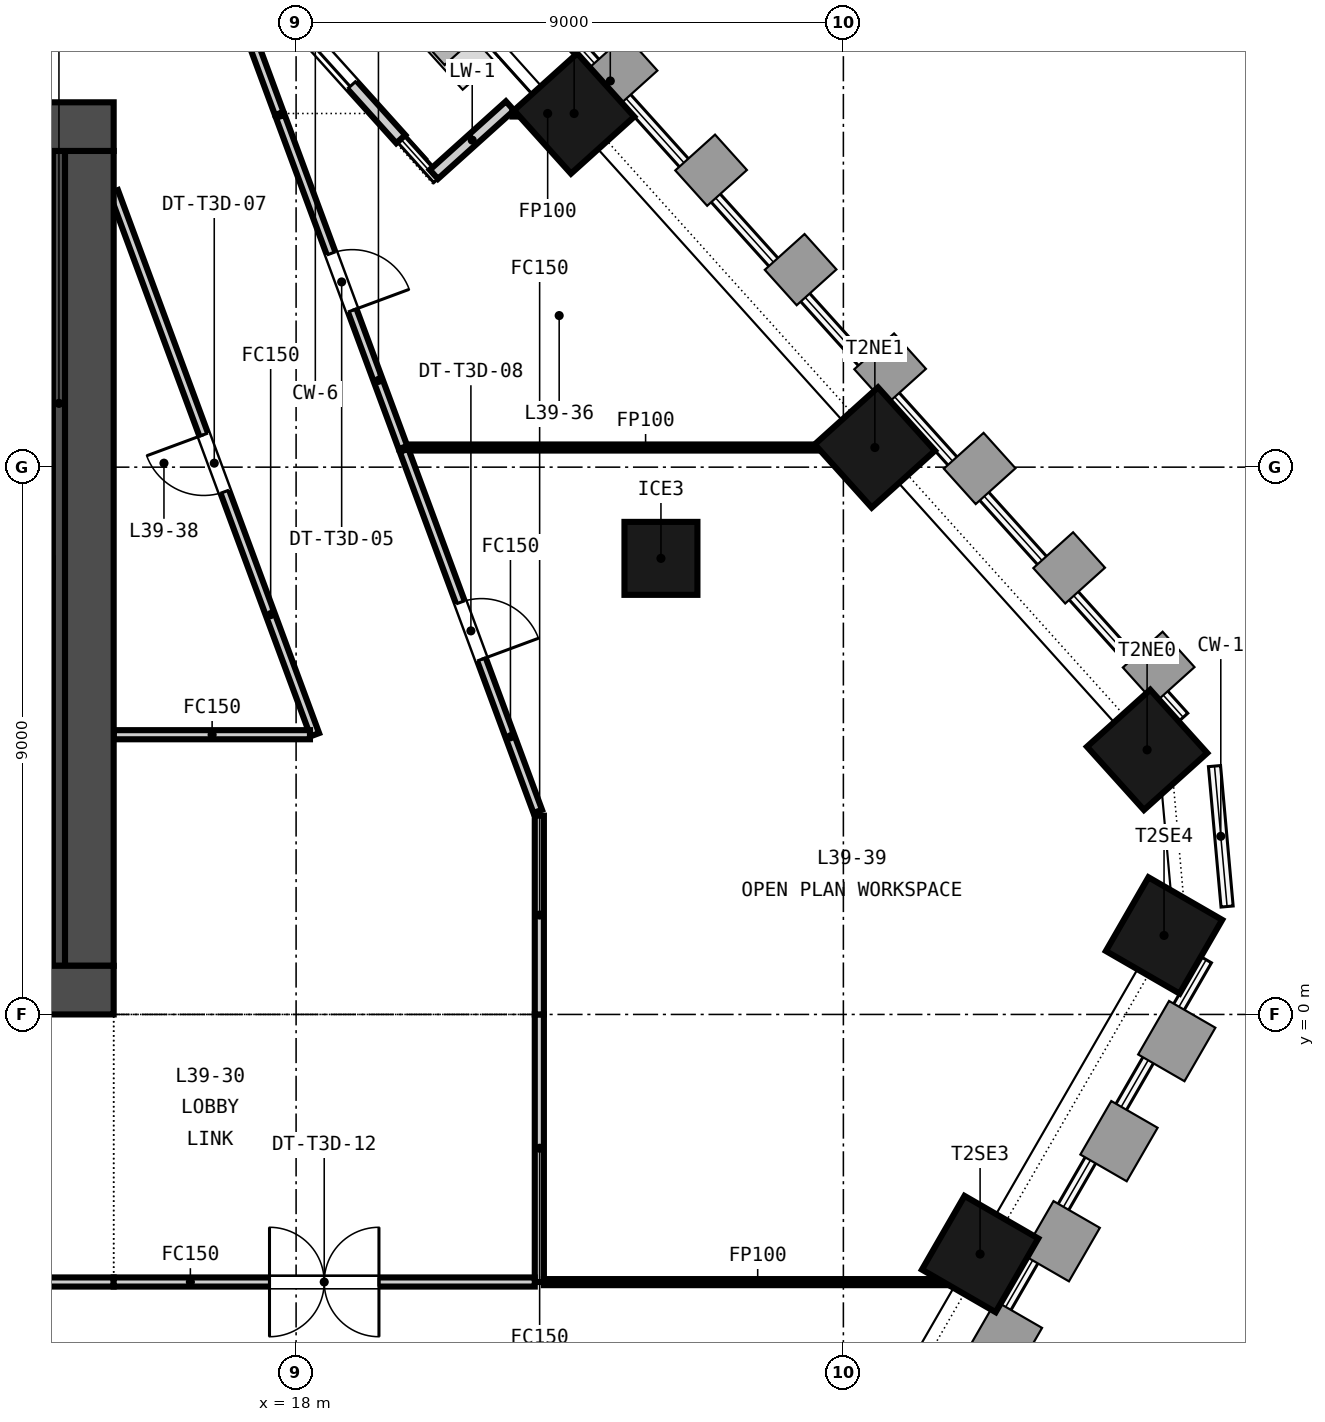
"""IFC4 building model, lengths in metres.
Left out: names, types, materials, properties, quantities, classifications, styles, units other than length and angle.
Written with IfcOpenShell. Run it as: python <this file> out.ifc"""

import sys

from ifc_helpers import new_model, si_unit, direction, frame, frame_2d, origin, origin_2d, place, context, subcontext, project, spatial, rectangle, extrude, element, fill, save


model = new_model("IFC4")
c1 = context("Model", 3, precision=1e-05, world=origin(), true_north=direction((0.0, 1.0)))
c2 = subcontext(c1, "Body", "Model", "MODEL_VIEW")
j1 = project(units=[si_unit("LENGTHUNIT", "METRE"), si_unit("PLANEANGLEUNIT", "RADIAN")], contexts=[c1])
p1 = place(None, origin())
s1 = spatial("IfcSite", under=j1, at=p1, CompositionType="ELEMENT")
p2 = place(p1, origin())
s2 = spatial("IfcBuilding", under=s1, at=p2, CompositionType="ELEMENT")
p3 = place(p2, frame((0.0, 0.0, 159.0)))
s3 = spatial("IfcBuildingStorey", under=s2, at=p3, CompositionType="ELEMENT", Elevation=159.0)
p4 = place(p3, frame((-15.0, 0.4, -0.15), z_axis=(0.0, 0.0, 1.0), x_axis=(1.0, 0.0, 0.0)))
e1 = element("IfcWall", 1, at=p4, inside=s3, PredefinedType="SOLIDWALL", context=c2, shape_type="SweptSolid", body=[
    extrude(rectangle(XDim=30.0, YDim=0.8, at=frame_2d((15.0, 0.0))), origin(), (0.0, 0.0, 1.0), 3.65),
])
p5 = place(p4, frame((5.8, 0.0, 0.15)))
e2 = element("IfcOpeningElement", 2, at=p5, cuts=e1, PredefinedType="OPENING", context=c2, shape_type="SweptSolid", body=[
    extrude(rectangle(XDim=2.4, YDim=2.4, at=frame_2d((1.2, 1.2))), frame((0.0, 0.41, 0.0), z_axis=(0.0, -1.0, 0.0), x_axis=(1.0, 0.0, 0.0)), (0.0, 0.0, 1.0), 0.82),
])
p6 = place(p4, frame((13.8, 0.0, 0.15)))
e3 = element("IfcOpeningElement", 3, at=p6, cuts=e1, PredefinedType="OPENING", context=c2, shape_type="SweptSolid", body=[
    extrude(rectangle(XDim=2.4, YDim=2.4, at=frame_2d((1.2, 1.2))), frame((0.0, 0.41, 0.0), z_axis=(0.0, -1.0, 0.0), x_axis=(1.0, 0.0, 0.0)), (0.0, 0.0, 1.0), 0.82),
])
p7 = place(p4, frame((21.8, 0.0, 0.15)))
e4 = element("IfcOpeningElement", 4, at=p7, cuts=e1, PredefinedType="OPENING", context=c2, shape_type="SweptSolid", body=[
    extrude(rectangle(XDim=2.4, YDim=2.4, at=frame_2d((1.2, 1.2))), frame((0.0, 0.41, 0.0), z_axis=(0.0, -1.0, 0.0), x_axis=(1.0, 0.0, 0.0)), (0.0, 0.0, 1.0), 0.82),
])
p8 = place(p4, frame((1.5, 0.0, 0.15)))
e5 = element("IfcOpeningElement", 5, at=p8, cuts=e1, PredefinedType="OPENING", context=c2, shape_type="SweptSolid", body=[
    extrude(rectangle(XDim=1.2, YDim=2.1, at=frame_2d((0.6, 1.05))), frame((0.0, 0.41, 0.0), z_axis=(0.0, -1.0, 0.0), x_axis=(1.0, 0.0, 0.0)), (0.0, 0.0, 1.0), 0.82),
])
p9 = place(p4, frame((27.3, 0.0, 0.15)))
e6 = element("IfcOpeningElement", 6, at=p9, cuts=e1, PredefinedType="OPENING", context=c2, shape_type="SweptSolid", body=[
    extrude(rectangle(XDim=1.2, YDim=2.1, at=frame_2d((0.6, 1.05))), frame((0.0, 0.41, 0.0), z_axis=(0.0, -1.0, 0.0), x_axis=(1.0, 0.0, 0.0)), (0.0, 0.0, 1.0), 0.82),
])
p10 = place(p3, frame((-15.0, 14.6, -0.15), z_axis=(0.0, 0.0, 1.0), x_axis=(1.0, 0.0, 0.0)))
e7 = element("IfcWall", 7, at=p10, inside=s3, PredefinedType="SOLIDWALL", context=c2, shape_type="SweptSolid", body=[
    extrude(rectangle(XDim=30.0, YDim=0.8, at=frame_2d((15.0, 0.0))), origin(), (0.0, 0.0, 1.0), 3.65),
])
p11 = place(p10, frame((9.25, 0.0, 0.15)))
e8 = element("IfcOpeningElement", 8, at=p11, cuts=e7, PredefinedType="OPENING", context=c2, shape_type="SweptSolid", body=[
    extrude(rectangle(XDim=1.5, YDim=2.1, at=frame_2d((0.75, 1.05))), frame((0.0, 0.41, 0.0), z_axis=(0.0, -1.0, 0.0), x_axis=(1.0, 0.0, 0.0)), (0.0, 0.0, 1.0), 0.82),
])
p12 = place(p10, frame((19.4, 0.0, 0.15)))
e9 = element("IfcOpeningElement", 9, at=p12, cuts=e7, PredefinedType="OPENING", context=c2, shape_type="SweptSolid", body=[
    extrude(rectangle(XDim=1.5, YDim=2.1, at=frame_2d((0.75, 1.05))), frame((0.0, 0.41, 0.0), z_axis=(0.0, -1.0, 0.0), x_axis=(1.0, 0.0, 0.0)), (0.0, 0.0, 1.0), 0.82),
])
p13 = place(p10, frame((1.5, 0.0, 0.15)))
e10 = element("IfcOpeningElement", 10, at=p13, cuts=e7, PredefinedType="OPENING", context=c2, shape_type="SweptSolid", body=[
    extrude(rectangle(XDim=1.2, YDim=2.1, at=frame_2d((0.6, 1.05))), frame((0.0, 0.41, 0.0), z_axis=(0.0, -1.0, 0.0), x_axis=(1.0, 0.0, 0.0)), (0.0, 0.0, 1.0), 0.82),
])
p14 = place(p10, frame((27.3, 0.0, 0.15)))
e11 = element("IfcOpeningElement", 11, at=p14, cuts=e7, PredefinedType="OPENING", context=c2, shape_type="SweptSolid", body=[
    extrude(rectangle(XDim=1.2, YDim=2.1, at=frame_2d((0.6, 1.05))), frame((0.0, 0.41, 0.0), z_axis=(0.0, -1.0, 0.0), x_axis=(1.0, 0.0, 0.0)), (0.0, 0.0, 1.0), 0.82),
])
p15 = place(p3, frame((14.6, 0.8, -0.15), z_axis=(0.0, 0.0, 1.0), x_axis=(0.0, 1.0, 0.0)))
e12 = element("IfcWall", 12, at=p15, inside=s3, PredefinedType="SOLIDWALL", context=c2, shape_type="SweptSolid", body=[
    extrude(rectangle(XDim=13.4, YDim=0.8, at=frame_2d((6.7, 0.0))), origin(), (0.0, 0.0, 1.0), 3.65),
])
for number, where, z_axis, x_axis in (
    (13, (29.248, -3.94, -0.15), (0.0, 0.0, 1.0), (0.5, 0.866, 0.0)),
    (14, (32.273, 1.299, -0.15), (0.0, 0.0, 1.0), (0.5, 0.866, 0.0)),
    (15, (31.995, 4.351, -0.15), (0.0, 0.0, 1.0), (-0.669, 0.743, 0.0)),
    (16, (27.518, 9.323, -0.15), (0.0, 0.0, 1.0), (-0.669, 0.743, 0.0)),
    (17, (22.573, 14.816, -0.15), (0.0, 0.0, 1.0), (-0.669, 0.743, 0.0)),
):
    element("IfcColumn", number, at=place(p3, frame(where, z_axis=z_axis, x_axis=x_axis)), inside=s3, PredefinedType="COLUMN", context=c2, shape_type="SweptSolid", body=[
        extrude(rectangle(XDim=1.4, YDim=1.4, at=origin_2d()), origin(), (0.0, 0.0, 1.0), 3.65),
    ])
p16 = place(p3, frame((24.0, 7.5, -0.15), z_axis=(0.0, 0.0, 1.0), x_axis=(1.0, 0.0, 0.0)))
e18 = element("IfcColumn", 18, at=p16, inside=s3, PredefinedType="COLUMN", context=c2, shape_type="SweptSolid", body=[
    extrude(rectangle(XDim=1.2, YDim=1.2, at=origin_2d()), origin(), (0.0, 0.0, 1.0), 3.65),
])
p17 = place(p3, frame((19.721, 14.395, 0.0), z_axis=(0.0, 0.0, 1.0), x_axis=(-0.669170241733, 0.743109135712, 0.0)))
e19 = element("IfcWall", 19, at=p17, inside=s3, PredefinedType="SOLIDWALL", context=c2, shape_type="SweptSolid", body=[
    extrude(rectangle(XDim=4.2, YDim=0.2, at=frame_2d((2.1, 0.0))), origin(), (0.0, 0.0, 1.0), 2.897),
])
p18 = place(p17, frame((1.2, 0.0, 0.0)))
e20 = element("IfcOpeningElement", 20, at=p18, cuts=e19, PredefinedType="OPENING", context=c2, shape_type="SweptSolid", body=[
    extrude(rectangle(XDim=1.8, YDim=2.4, at=frame_2d((0.9, 1.2))), frame((0.0, 0.11, 0.0), z_axis=(0.0, -1.0, 0.0), x_axis=(1.0, 0.0, 0.0)), (0.0, 0.0, 1.0), 0.22),
])
p19 = place(p3, frame((21.517, 14.942, 0.0), z_axis=(0.0, 0.0, 1.0), x_axis=(-0.743178790238, -0.669092882745, 0.0)))
e21 = element("IfcWall", 21, at=p19, inside=s3, PredefinedType="SOLIDWALL", context=c2, shape_type="SweptSolid", body=[
    extrude(rectangle(XDim=1.684, YDim=0.2, at=frame_2d((0.842, 0.0))), origin(), (0.0, 0.0, 1.0), 2.897),
])
p20 = place(p3, frame((11.05, 7.35, 0.0), z_axis=(0.0, 0.0, 1.0), x_axis=(1.0, 0.0, 0.0)))
e22 = element("IfcWall", 22, at=p20, inside=s3, PredefinedType="SOLIDWALL", context=c2, shape_type="SweptSolid", body=[
    extrude(rectangle(XDim=2.95, YDim=0.3, at=frame_2d((1.475, 0.0))), origin(), (0.0, 0.0, 1.0), 3.5),
])
p21 = place(p3, frame((14.1, 0.8, 0.0), z_axis=(0.0, 0.0, 1.0), x_axis=(0.0, 1.0, 0.0)))
e23 = element("IfcWall", 23, at=p21, inside=s3, PredefinedType="SOLIDWALL", context=c2, shape_type="SweptSolid", body=[
    extrude(rectangle(XDim=13.4, YDim=0.2, at=frame_2d((6.7, 0.0))), origin(), (0.0, 0.0, 1.0), 3.5),
])
p22 = place(p3, frame((15.0, -4.4, 0.0), z_axis=(0.0, 0.0, 1.0), x_axis=(-1.0, 0.0, 0.0)))
e24 = element("IfcWall", 24, at=p22, inside=s3, PredefinedType="PARTITIONING", context=c2, shape_type="SweptSolid", body=[
    extrude(rectangle(XDim=10.505, YDim=0.15, at=frame_2d((5.252, 0.0))), origin(), (0.0, 0.0, 1.0), 2.741),
])
p23 = place(p22, frame((4.353, 0.0, 0.0)))
e25 = element("IfcOpeningElement", 25, at=p23, cuts=e24, PredefinedType="OPENING", context=c2, shape_type="SweptSolid", body=[
    extrude(rectangle(XDim=1.8, YDim=2.1, at=frame_2d((0.9, 1.05))), frame((0.0, 0.085, 0.0), z_axis=(0.0, -1.0, 0.0), x_axis=(1.0, 0.0, 0.0)), (0.0, 0.0, 1.0), 0.17),
])
p24 = place(p3, frame((22.0, 0.0, 0.0), z_axis=(0.0, 0.0, 1.0), x_axis=(0.0, -1.0, 0.0)))
e26 = element("IfcWall", 26, at=p24, inside=s3, PredefinedType="PARTITIONING", context=c2, shape_type="SweptSolid", body=[
    extrude(rectangle(XDim=4.4, YDim=0.15, at=frame_2d((2.2, 0.0))), origin(), (0.0, 0.0, 1.0), 2.741),
])
p25 = place(p3, frame((21.925, -4.4, 0.0), z_axis=(0.0, 0.0, 1.0), x_axis=(-1.0, 0.0, 0.0)))
e27 = element("IfcWall", 27, at=p25, inside=s3, PredefinedType="PARTITIONING", context=c2, shape_type="SweptSolid", body=[
    extrude(rectangle(XDim=6.925, YDim=0.15, at=frame_2d((3.462, 0.0))), origin(), (0.0, 0.0, 1.0), 2.741),
])
p26 = place(p25, frame((2.562, 0.0, 0.0)))
e28 = element("IfcOpeningElement", 28, at=p26, cuts=e27, PredefinedType="OPENING", context=c2, shape_type="SweptSolid", body=[
    extrude(rectangle(XDim=1.8, YDim=2.1, at=frame_2d((0.9, 1.05))), frame((0.0, 0.085, 0.0), z_axis=(0.0, -1.0, 0.0), x_axis=(1.0, 0.0, 0.0)), (0.0, 0.0, 1.0), 0.17),
])
p27 = place(p3, frame((18.308, 4.6, 0.0), z_axis=(0.0, 0.0, 1.0), x_axis=(-0.347347751601, 0.937736391241, 0.0)))
e29 = element("IfcWall", 29, at=p27, inside=s3, PredefinedType="PARTITIONING", context=c2, shape_type="SweptSolid", body=[
    extrude(rectangle(XDim=9.524, YDim=0.15, at=frame_2d((4.762, 0.0))), origin(), (0.0, 0.0, 1.0), 2.741),
])
p28 = place(p27, frame((4.262, 0.0, 0.0)))
e30 = element("IfcOpeningElement", 30, at=p28, cuts=e29, PredefinedType="OPENING", context=c2, shape_type="SweptSolid", body=[
    extrude(rectangle(XDim=1.0, YDim=2.1, at=frame_2d((0.5, 1.05))), frame((0.0, 0.085, 0.0), z_axis=(0.0, -1.0, 0.0), x_axis=(1.0, 0.0, 0.0)), (0.0, 0.0, 1.0), 0.17),
])
p29 = place(p3, frame((22.0, 3.269, 0.0), z_axis=(0.0, 0.0, 1.0), x_axis=(0.0, -1.0, 0.0)))
e31 = element("IfcWall", 31, at=p29, inside=s3, PredefinedType="PARTITIONING", context=c2, shape_type="SweptSolid", body=[
    extrude(rectangle(XDim=3.269, YDim=0.15, at=frame_2d((1.635, 0.0))), origin(), (0.0, 0.0, 1.0), 2.741),
])
p30 = place(p3, frame((16.617, 17.802, 0.0), z_axis=(0.0, 0.0, 1.0), x_axis=(0.347221966082, -0.937782973971, 0.0)))
e32 = element("IfcWall", 32, at=p30, inside=s3, PredefinedType="PARTITIONING", context=c2, shape_type="SweptSolid", body=[
    extrude(rectangle(XDim=3.185, YDim=0.15, at=frame_2d((1.592, 0.0))), origin(), (0.0, 0.0, 1.0), 2.741),
])
p31 = place(p3, frame((21.557, 14.816, 0.0), z_axis=(0.0, 0.0, 1.0), x_axis=(1.0, 0.0, 0.0)))
e33 = element("IfcWall", 33, at=p31, inside=s3, PredefinedType="PARTITIONING", context=c2, shape_type="SweptSolid", body=[
    extrude(rectangle(XDim=1.15, YDim=0.1, at=frame_2d((0.575, 0.0))), origin(), (0.0, 0.0, 1.0), 2.741),
])
p32 = place(p3, frame((17.74, 14.769, 0.0), z_axis=(0.0, 0.0, 1.0), x_axis=(0.347393763434, -0.937719346674, 0.0)))
e34 = element("IfcWall", 34, at=p32, inside=s3, PredefinedType="PARTITIONING", context=c2, shape_type="SweptSolid", body=[
    extrude(rectangle(XDim=5.808, YDim=0.15, at=frame_2d((2.904, 0.0))), origin(), (0.0, 0.0, 1.0), 2.741),
])
p33 = place(p32, frame((2.404, 0.0, 0.0)))
e35 = element("IfcOpeningElement", 35, at=p33, cuts=e34, PredefinedType="OPENING", context=c2, shape_type="SweptSolid", body=[
    extrude(rectangle(XDim=1.0, YDim=2.1, at=frame_2d((0.5, 1.05))), frame((0.0, 0.085, 0.0), z_axis=(0.0, -1.0, 0.0), x_axis=(1.0, 0.0, 0.0)), (0.0, 0.0, 1.0), 0.17),
])
p34 = place(p3, frame((19.833, 9.323, 0.0), z_axis=(0.0, 0.0, 1.0), x_axis=(1.0, 0.0, 0.0)))
e36 = element("IfcWall", 36, at=p34, inside=s3, PredefinedType="PARTITIONING", context=c2, shape_type="SweptSolid", body=[
    extrude(rectangle(XDim=7.819, YDim=0.1, at=frame_2d((3.91, 0.0))), origin(), (0.0, 0.0, 1.0), 2.741),
])
p35 = place(p3, frame((15.0, 4.6, 0.0), z_axis=(0.0, 0.0, 1.0), x_axis=(1.0, 0.0, 0.0)))
e37 = element("IfcWall", 37, at=p35, inside=s3, PredefinedType="PARTITIONING", context=c2, shape_type="SweptSolid", body=[
    extrude(rectangle(XDim=3.228, YDim=0.15, at=frame_2d((1.614, 0.0))), origin(), (0.0, 0.0, 1.0), 2.741),
])
p36 = place(p3, frame((19.775, 9.276, 0.0), z_axis=(0.0, 0.0, 1.0), x_axis=(0.347304307854, -0.937752482133, 0.0)))
e38 = element("IfcWall", 38, at=p36, inside=s3, PredefinedType="PARTITIONING", context=c2, shape_type="SweptSolid", body=[
    extrude(rectangle(XDim=6.331, YDim=0.15, at=frame_2d((3.166, 0.0))), origin(), (0.0, 0.0, 1.0), 2.741),
])
p37 = place(p36, frame((2.665, 0.0, 0.0)))
e39 = element("IfcOpeningElement", 39, at=p37, cuts=e38, PredefinedType="OPENING", context=c2, shape_type="SweptSolid", body=[
    extrude(rectangle(XDim=1.0, YDim=2.1, at=frame_2d((0.5, 1.05))), frame((0.0, 0.085, 0.0), z_axis=(0.0, -1.0, 0.0), x_axis=(1.0, 0.0, 0.0)), (0.0, 0.0, 1.0), 0.17),
])
p38 = place(p3, frame((22.075, -4.402, 0.0), z_axis=(0.0, 0.0, 1.0), x_axis=(1.0, 0.0, 0.0)))
e40 = element("IfcWall", 40, at=p38, inside=s3, PredefinedType="PARTITIONING", context=c2, shape_type="SweptSolid", body=[
    extrude(rectangle(XDim=7.022, YDim=0.1, at=frame_2d((3.511, 0.0))), origin(), (0.0, 0.0, 1.0), 2.741),
])
p39 = place(p18, origin())
e41 = element("IfcDoor", 41, at=p39, inside=s3, OperationType="SINGLE_SWING_LEFT", PredefinedType="DOOR", context=c2, shape_type="SweptSolid", body=[
    extrude(rectangle(XDim=1.8, YDim=2.4, at=frame_2d((0.9, 1.2))), frame((0.0, 0.025, 0.0), z_axis=(0.0, -1.0, 0.0), x_axis=(1.0, 0.0, 0.0)), (0.0, 0.0, 1.0), 0.05),
])
fill(e20, e41)
p40 = place(p33, origin())
e42 = element("IfcDoor", 42, at=p40, inside=s3, OperationType="SINGLE_SWING_RIGHT", PredefinedType="DOOR", context=c2, shape_type="SweptSolid", body=[
    extrude(rectangle(XDim=1.0, YDim=2.1, at=frame_2d((0.5, 1.05))), frame((0.0, 0.025, 0.0), z_axis=(0.0, -1.0, 0.0), x_axis=(1.0, 0.0, 0.0)), (0.0, 0.0, 1.0), 0.05),
])
fill(e35, e42)
p41 = place(p28, origin())
e43 = element("IfcDoor", 43, at=p41, inside=s3, OperationType="SINGLE_SWING_RIGHT", PredefinedType="DOOR", context=c2, shape_type="SweptSolid", body=[
    extrude(rectangle(XDim=1.0, YDim=2.1, at=frame_2d((0.5, 1.05))), frame((0.0, 0.025, 0.0), z_axis=(0.0, -1.0, 0.0), x_axis=(1.0, 0.0, 0.0)), (0.0, 0.0, 1.0), 0.05),
])
fill(e30, e43)
p42 = place(p37, origin())
e44 = element("IfcDoor", 44, at=p42, inside=s3, OperationType="SINGLE_SWING_RIGHT", PredefinedType="DOOR", context=c2, shape_type="SweptSolid", body=[
    extrude(rectangle(XDim=1.0, YDim=2.1, at=frame_2d((0.5, 1.05))), frame((0.0, 0.025, 0.0), z_axis=(0.0, -1.0, 0.0), x_axis=(1.0, 0.0, 0.0)), (0.0, 0.0, 1.0), 0.05),
])
fill(e39, e44)
p43 = place(p26, origin())
e45 = element("IfcDoor", 45, at=p43, inside=s3, OperationType="DOUBLE_DOOR_DOUBLE_SWING", PredefinedType="DOOR", context=c2, shape_type="SweptSolid", body=[
    extrude(rectangle(XDim=1.8, YDim=2.1, at=frame_2d((0.9, 1.05))), frame((0.0, 0.025, 0.0), z_axis=(0.0, -1.0, 0.0), x_axis=(1.0, 0.0, 0.0)), (0.0, 0.0, 1.0), 0.05),
])
fill(e28, e45)
save(model, sys.argv[1])
